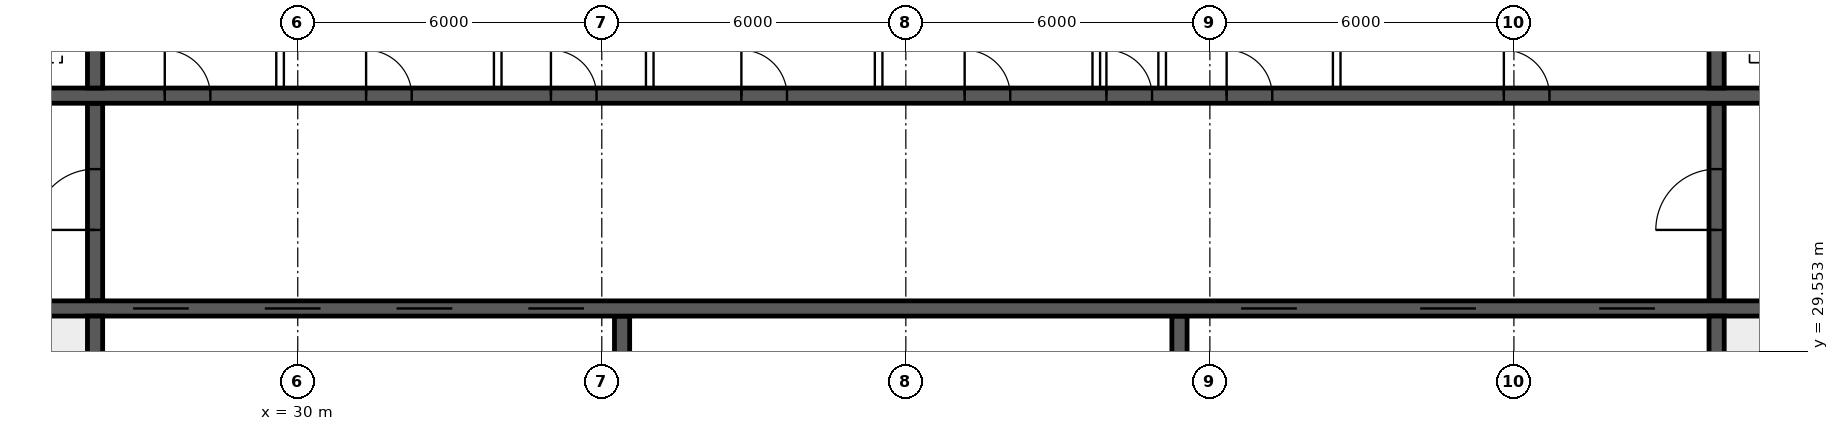
"""IFC4 building model, lengths in metres.
Left out: names, types, materials, properties, quantities, classifications, styles, units other than length and angle.
Written with IfcOpenShell. Run it as: python <this file> out.ifc"""

import sys

from ifc_helpers import new_model, si_unit, direction, frame, frame_2d, origin, place, context, subcontext, project, spatial, rectangle, extrude, element, fill, save


model = new_model("IFC4")
c1 = context("Model", 3, precision=1e-05, world=origin(), true_north=direction((0.0, 1.0)))
c2 = subcontext(c1, "Body", "Model", "MODEL_VIEW")
j1 = project(units=[si_unit("LENGTHUNIT", "METRE"), si_unit("PLANEANGLEUNIT", "RADIAN")], contexts=[c1])
p1 = place(None, origin())
s1 = spatial("IfcSite", under=j1, at=p1, CompositionType="ELEMENT")
p2 = place(p1, origin())
s2 = spatial("IfcBuilding", under=s1, at=p2, CompositionType="ELEMENT")
p3 = place(p2, frame((0.0, 0.0, 11.0)))
s3 = spatial("IfcBuildingStorey", under=s2, at=p3, CompositionType="ELEMENT", Elevation=11.0)
p4 = place(p3, frame((18.5, 30.4, 0.0), z_axis=(0.0, 0.0, 1.0), x_axis=(1.0, 0.0, 0.0)))
e1 = element("IfcWall", 1, at=p4, inside=s3, PredefinedType="SHEAR", context=c2, shape_type="SweptSolid", body=[
    extrude(rectangle(XDim=47.0, YDim=0.3, at=frame_2d((23.5, 0.0))), origin(), (0.0, 0.0, 1.0), 5.0),
])
p5 = place(p4, frame((0.4, 0.0, 0.0)))
e2 = element("IfcOpeningElement", 2, at=p5, cuts=e1, PredefinedType="OPENING", context=c2, shape_type="SweptSolid", body=[
    extrude(rectangle(XDim=1.0, YDim=2.1, at=frame_2d((0.5, 1.05))), frame((0.0, 0.16, 0.0), z_axis=(0.0, -1.0, 0.0), x_axis=(1.0, 0.0, 0.0)), (0.0, 0.0, 1.0), 0.32),
])
p6 = place(p4, frame((45.6, 0.0, 0.0)))
e3 = element("IfcOpeningElement", 3, at=p6, cuts=e1, PredefinedType="OPENING", context=c2, shape_type="SweptSolid", body=[
    extrude(rectangle(XDim=1.0, YDim=2.1, at=frame_2d((0.5, 1.05))), frame((0.0, 0.16, 0.0), z_axis=(0.0, -1.0, 0.0), x_axis=(1.0, 0.0, 0.0)), (0.0, 0.0, 1.0), 0.32),
])
p7 = place(p4, frame((8.25, 0.0, 0.0)))
e4 = element("IfcOpeningElement", 4, at=p7, cuts=e1, PredefinedType="OPENING", context=c2, shape_type="SweptSolid", body=[
    extrude(rectangle(XDim=1.1, YDim=2.1, at=frame_2d((0.55, 1.05))), frame((0.0, 0.16, 0.0), z_axis=(0.0, -1.0, 0.0), x_axis=(1.0, 0.0, 0.0)), (0.0, 0.0, 1.0), 0.32),
])
p8 = place(p4, frame((10.85, 0.0, 0.0)))
e5 = element("IfcOpeningElement", 5, at=p8, cuts=e1, PredefinedType="OPENING", context=c2, shape_type="SweptSolid", body=[
    extrude(rectangle(XDim=1.1, YDim=2.1, at=frame_2d((0.55, 1.05))), frame((0.0, 0.16, 0.0), z_axis=(0.0, -1.0, 0.0), x_axis=(1.0, 0.0, 0.0)), (0.0, 0.0, 1.0), 0.32),
])
p9 = place(p4, frame((13.45, 0.0, 0.0)))
e6 = element("IfcOpeningElement", 6, at=p9, cuts=e1, PredefinedType="OPENING", context=c2, shape_type="SweptSolid", body=[
    extrude(rectangle(XDim=1.1, YDim=2.1, at=frame_2d((0.55, 1.05))), frame((0.0, 0.16, 0.0), z_axis=(0.0, -1.0, 0.0), x_axis=(1.0, 0.0, 0.0)), (0.0, 0.0, 1.0), 0.32),
])
p10 = place(p4, frame((16.05, 0.0, 0.0)))
e7 = element("IfcOpeningElement", 7, at=p10, cuts=e1, PredefinedType="OPENING", context=c2, shape_type="SweptSolid", body=[
    extrude(rectangle(XDim=1.1, YDim=2.1, at=frame_2d((0.55, 1.05))), frame((0.0, 0.16, 0.0), z_axis=(0.0, -1.0, 0.0), x_axis=(1.0, 0.0, 0.0)), (0.0, 0.0, 1.0), 0.32),
])
p11 = place(p4, frame((30.117, 0.0, 0.0)))
e8 = element("IfcOpeningElement", 8, at=p11, cuts=e1, PredefinedType="OPENING", context=c2, shape_type="SweptSolid", body=[
    extrude(rectangle(XDim=1.1, YDim=2.1, at=frame_2d((0.55, 1.05))), frame((0.0, 0.16, 0.0), z_axis=(0.0, -1.0, 0.0), x_axis=(1.0, 0.0, 0.0)), (0.0, 0.0, 1.0), 0.32),
])
p12 = place(p4, frame((33.65, 0.0, 0.0)))
e9 = element("IfcOpeningElement", 9, at=p12, cuts=e1, PredefinedType="OPENING", context=c2, shape_type="SweptSolid", body=[
    extrude(rectangle(XDim=1.1, YDim=2.1, at=frame_2d((0.55, 1.05))), frame((0.0, 0.16, 0.0), z_axis=(0.0, -1.0, 0.0), x_axis=(1.0, 0.0, 0.0)), (0.0, 0.0, 1.0), 0.32),
])
p13 = place(p4, frame((37.183, 0.0, 0.0)))
e10 = element("IfcOpeningElement", 10, at=p13, cuts=e1, PredefinedType="OPENING", context=c2, shape_type="SweptSolid", body=[
    extrude(rectangle(XDim=1.1, YDim=2.1, at=frame_2d((0.55, 1.05))), frame((0.0, 0.16, 0.0), z_axis=(0.0, -1.0, 0.0), x_axis=(1.0, 0.0, 0.0)), (0.0, 0.0, 1.0), 0.32),
])
p14 = place(p3, frame((18.5, 34.6, 0.0), z_axis=(0.0, 0.0, 1.0), x_axis=(1.0, 0.0, 0.0)))
e11 = element("IfcWall", 11, at=p14, inside=s3, PredefinedType="SHEAR", context=c2, shape_type="SweptSolid", body=[
    extrude(rectangle(XDim=47.0, YDim=0.3, at=frame_2d((23.5, 0.0))), origin(), (0.0, 0.0, 1.0), 5.0),
])
p15 = place(p14, frame((0.9, 0.0, 0.0)))
e12 = element("IfcOpeningElement", 12, at=p15, cuts=e11, PredefinedType="OPENING", context=c2, shape_type="SweptSolid", body=[
    extrude(rectangle(XDim=1.1, YDim=2.1, at=frame_2d((0.55, 1.05))), frame((0.0, 0.16, 0.0), z_axis=(0.0, -1.0, 0.0), x_axis=(1.0, 0.0, 0.0)), (0.0, 0.0, 1.0), 0.32),
])
p16 = place(p14, frame((45.0, 0.0, 0.0)))
e13 = element("IfcOpeningElement", 13, at=p16, cuts=e11, PredefinedType="OPENING", context=c2, shape_type="SweptSolid", body=[
    extrude(rectangle(XDim=1.1, YDim=2.1, at=frame_2d((0.55, 1.05))), frame((0.0, 0.16, 0.0), z_axis=(0.0, -1.0, 0.0), x_axis=(1.0, 0.0, 0.0)), (0.0, 0.0, 1.0), 0.32),
])
p17 = place(p14, frame((4.1, 0.0, 0.0)))
e14 = element("IfcOpeningElement", 14, at=p17, cuts=e11, PredefinedType="OPENING", context=c2, shape_type="SweptSolid", body=[
    extrude(rectangle(XDim=0.9, YDim=2.1, at=frame_2d((0.45, 1.05))), frame((0.0, 0.16, 0.0), z_axis=(0.0, -1.0, 0.0), x_axis=(1.0, 0.0, 0.0)), (0.0, 0.0, 1.0), 0.32),
])
p18 = place(p14, frame((42.0, 0.0, 0.0)))
e15 = element("IfcOpeningElement", 15, at=p18, cuts=e11, PredefinedType="OPENING", context=c2, shape_type="SweptSolid", body=[
    extrude(rectangle(XDim=0.9, YDim=2.1, at=frame_2d((0.45, 1.05))), frame((0.0, 0.16, 0.0), z_axis=(0.0, -1.0, 0.0), x_axis=(1.0, 0.0, 0.0)), (0.0, 0.0, 1.0), 0.32),
])
p19 = place(p14, frame((8.875, 0.0, 0.0)))
e16 = element("IfcOpeningElement", 16, at=p19, cuts=e11, PredefinedType="OPENING", context=c2, shape_type="SweptSolid", body=[
    extrude(rectangle(XDim=0.9, YDim=2.1, at=frame_2d((0.45, 1.05))), frame((0.0, 0.16, 0.0), z_axis=(0.0, -1.0, 0.0), x_axis=(1.0, 0.0, 0.0)), (0.0, 0.0, 1.0), 0.32),
])
p20 = place(p14, frame((12.849, 0.0, 0.0)))
e17 = element("IfcOpeningElement", 17, at=p20, cuts=e11, PredefinedType="OPENING", context=c2, shape_type="SweptSolid", body=[
    extrude(rectangle(XDim=0.9, YDim=2.1, at=frame_2d((0.45, 1.05))), frame((0.0, 0.16, 0.0), z_axis=(0.0, -1.0, 0.0), x_axis=(1.0, 0.0, 0.0)), (0.0, 0.0, 1.0), 0.32),
])
p21 = place(p14, frame((16.496, 0.0, 0.0)))
e18 = element("IfcOpeningElement", 18, at=p21, cuts=e11, PredefinedType="OPENING", context=c2, shape_type="SweptSolid", body=[
    extrude(rectangle(XDim=0.9, YDim=2.1, at=frame_2d((0.45, 1.05))), frame((0.0, 0.16, 0.0), z_axis=(0.0, -1.0, 0.0), x_axis=(1.0, 0.0, 0.0)), (0.0, 0.0, 1.0), 0.32),
])
p22 = place(p14, frame((20.255, 0.0, 0.0)))
e19 = element("IfcOpeningElement", 19, at=p22, cuts=e11, PredefinedType="OPENING", context=c2, shape_type="SweptSolid", body=[
    extrude(rectangle(XDim=0.9, YDim=2.1, at=frame_2d((0.45, 1.05))), frame((0.0, 0.16, 0.0), z_axis=(0.0, -1.0, 0.0), x_axis=(1.0, 0.0, 0.0)), (0.0, 0.0, 1.0), 0.32),
])
p23 = place(p14, frame((24.661, 0.0, 0.0)))
e20 = element("IfcOpeningElement", 20, at=p23, cuts=e11, PredefinedType="OPENING", context=c2, shape_type="SweptSolid", body=[
    extrude(rectangle(XDim=0.9, YDim=2.1, at=frame_2d((0.45, 1.05))), frame((0.0, 0.16, 0.0), z_axis=(0.0, -1.0, 0.0), x_axis=(1.0, 0.0, 0.0)), (0.0, 0.0, 1.0), 0.32),
])
p24 = place(p14, frame((27.458, 0.0, 0.0)))
e21 = element("IfcOpeningElement", 21, at=p24, cuts=e11, PredefinedType="OPENING", context=c2, shape_type="SweptSolid", body=[
    extrude(rectangle(XDim=0.9, YDim=2.1, at=frame_2d((0.45, 1.05))), frame((0.0, 0.16, 0.0), z_axis=(0.0, -1.0, 0.0), x_axis=(1.0, 0.0, 0.0)), (0.0, 0.0, 1.0), 0.32),
])
p25 = place(p14, frame((29.831, 0.0, 0.0)))
e22 = element("IfcOpeningElement", 22, at=p25, cuts=e11, PredefinedType="OPENING", context=c2, shape_type="SweptSolid", body=[
    extrude(rectangle(XDim=0.9, YDim=2.1, at=frame_2d((0.45, 1.05))), frame((0.0, 0.16, 0.0), z_axis=(0.0, -1.0, 0.0), x_axis=(1.0, 0.0, 0.0)), (0.0, 0.0, 1.0), 0.32),
])
p26 = place(p14, frame((35.302, 0.0, 0.0)))
e23 = element("IfcOpeningElement", 23, at=p26, cuts=e11, PredefinedType="OPENING", context=c2, shape_type="SweptSolid", body=[
    extrude(rectangle(XDim=0.9, YDim=2.1, at=frame_2d((0.45, 1.05))), frame((0.0, 0.16, 0.0), z_axis=(0.0, -1.0, 0.0), x_axis=(1.0, 0.0, 0.0)), (0.0, 0.0, 1.0), 0.32),
])
for number, where, z_axis, x_axis in (
    (24, (26.0, 26.3, 0.0), (0.0, 0.0, 1.0), (0.0, 1.0, 0.0)),
    (25, (58.0, 26.3, 0.0), (0.0, 0.0, 1.0), (0.0, 1.0, 0.0)),
):
    element("IfcWall", number, at=place(p3, frame(where, z_axis=z_axis, x_axis=x_axis)), inside=s3, PredefinedType="SHEAR", context=c2, shape_type="SweptSolid", body=[
        extrude(rectangle(XDim=3.95, YDim=0.3, at=frame_2d((1.975, 0.0))), origin(), (0.0, 0.0, 1.0), 5.0),
    ])
p27 = place(p3, frame((26.0, 30.55, 0.0), z_axis=(0.0, 0.0, 1.0), x_axis=(0.0, 1.0, 0.0)))
e26 = element("IfcWall", 26, at=p27, inside=s3, PredefinedType="SHEAR", context=c2, shape_type="SweptSolid", body=[
    extrude(rectangle(XDim=3.9, YDim=0.3, at=frame_2d((1.95, 0.0))), origin(), (0.0, 0.0, 1.0), 5.0),
])
p28 = place(p27, frame((1.4, 0.0, 0.0)))
e27 = element("IfcOpeningElement", 27, at=p28, cuts=e26, PredefinedType="OPENING", context=c2, shape_type="SweptSolid", body=[
    extrude(rectangle(XDim=1.2, YDim=2.1, at=frame_2d((0.6, 1.05))), frame((0.0, 0.16, 0.0), z_axis=(0.0, -1.0, 0.0), x_axis=(1.0, 0.0, 0.0)), (0.0, 0.0, 1.0), 0.32),
])
p29 = place(p3, frame((58.0, 30.55, 0.0), z_axis=(0.0, 0.0, 1.0), x_axis=(0.0, 1.0, 0.0)))
e28 = element("IfcWall", 28, at=p29, inside=s3, PredefinedType="SHEAR", context=c2, shape_type="SweptSolid", body=[
    extrude(rectangle(XDim=3.9, YDim=0.3, at=frame_2d((1.95, 0.0))), origin(), (0.0, 0.0, 1.0), 5.0),
])
p30 = place(p29, frame((1.4, 0.0, 0.0)))
e29 = element("IfcOpeningElement", 29, at=p30, cuts=e28, PredefinedType="OPENING", context=c2, shape_type="SweptSolid", body=[
    extrude(rectangle(XDim=1.2, YDim=2.1, at=frame_2d((0.6, 1.05))), frame((0.0, 0.16, 0.0), z_axis=(0.0, -1.0, 0.0), x_axis=(1.0, 0.0, 0.0)), (0.0, 0.0, 1.0), 0.32),
])
for number, where, z_axis, x_axis in (
    (30, (26.0, 34.75, 0.0), (0.0, 0.0, 1.0), (0.0, 1.0, 0.0)),
    (31, (58.0, 34.75, 0.0), (0.0, 0.0, 1.0), (0.0, 1.0, 0.0)),
):
    element("IfcWall", number, at=place(p3, frame(where, z_axis=z_axis, x_axis=x_axis)), inside=s3, PredefinedType="SHEAR", context=c2, shape_type="SweptSolid", body=[
        extrude(rectangle(XDim=2.95, YDim=0.3, at=frame_2d((1.475, 0.0))), origin(), (0.0, 0.0, 1.0), 5.0),
    ])
for number, where, z_axis, x_axis in (
    (32, (36.4, 26.3, 0.0), (0.0, 0.0, 1.0), (0.0, 1.0, 0.0)),
    (33, (47.4, 26.3, 0.0), (0.0, 0.0, 1.0), (0.0, 1.0, 0.0)),
):
    element("IfcWall", number, at=place(p3, frame(where, z_axis=z_axis, x_axis=x_axis)), inside=s3, PredefinedType="SHEAR", context=c2, shape_type="SweptSolid", body=[
        extrude(rectangle(XDim=3.95, YDim=0.3, at=frame_2d((1.975, 0.0))), origin(), (0.0, 0.0, 1.0), 5.0),
    ])
for number, where, z_axis, x_axis in (
    (34, (29.651, 34.75, 0.0), (0.0, 0.0, 1.0), (0.0, 1.0, 0.0)),
    (35, (33.946, 34.75, 0.0), (0.0, 0.0, 1.0), (0.0, 1.0, 0.0)),
    (36, (36.946, 34.75, 0.0), (0.0, 0.0, 1.0), (0.0, 1.0, 0.0)),
    (37, (41.463, 34.75, 0.0), (0.0, 0.0, 1.0), (0.0, 1.0, 0.0)),
    (38, (45.758, 34.75, 0.0), (0.0, 0.0, 1.0), (0.0, 1.0, 0.0)),
    (39, (47.058, 34.75, 0.0), (0.0, 0.0, 1.0), (0.0, 1.0, 0.0)),
    (40, (50.503, 34.75, 0.0), (0.0, 0.0, 1.0), (0.0, 1.0, 0.0)),
):
    element("IfcWall", number, at=place(p3, frame(where, z_axis=z_axis, x_axis=x_axis)), inside=s3, PredefinedType="SOLIDWALL", context=c2, shape_type="SweptSolid", body=[
        extrude(rectangle(XDim=2.95, YDim=0.15, at=frame_2d((1.475, 0.0))), origin(), (0.0, 0.0, 1.0), 4.6),
    ])
p31 = place(p28, origin())
e41 = element("IfcDoor", 41, at=p31, inside=s3, OperationType="SINGLE_SWING_LEFT", PredefinedType="DOOR", context=c2, shape_type="SweptSolid", body=[
    extrude(rectangle(XDim=1.2, YDim=2.1, at=frame_2d((0.6, 1.05))), frame((0.0, 0.025, 0.0), z_axis=(0.0, -1.0, 0.0), x_axis=(1.0, 0.0, 0.0)), (0.0, 0.0, 1.0), 0.05),
])
fill(e27, e41)
p32 = place(p30, origin())
e42 = element("IfcDoor", 42, at=p32, inside=s3, OperationType="SINGLE_SWING_LEFT", PredefinedType="DOOR", context=c2, shape_type="SweptSolid", body=[
    extrude(rectangle(XDim=1.2, YDim=2.1, at=frame_2d((0.6, 1.05))), frame((0.0, 0.025, 0.0), z_axis=(0.0, -1.0, 0.0), x_axis=(1.0, 0.0, 0.0)), (0.0, 0.0, 1.0), 0.05),
])
fill(e29, e42)
p33 = place(p19, origin())
e43 = element("IfcDoor", 43, at=p33, inside=s3, OperationType="SINGLE_SWING_LEFT", PredefinedType="DOOR", context=c2, shape_type="SweptSolid", body=[
    extrude(rectangle(XDim=0.9, YDim=2.1, at=frame_2d((0.45, 1.05))), frame((0.0, 0.025, 0.0), z_axis=(0.0, -1.0, 0.0), x_axis=(1.0, 0.0, 0.0)), (0.0, 0.0, 1.0), 0.05),
])
fill(e16, e43)
p34 = place(p20, origin())
e44 = element("IfcDoor", 44, at=p34, inside=s3, OperationType="SINGLE_SWING_LEFT", PredefinedType="DOOR", context=c2, shape_type="SweptSolid", body=[
    extrude(rectangle(XDim=0.9, YDim=2.1, at=frame_2d((0.45, 1.05))), frame((0.0, 0.025, 0.0), z_axis=(0.0, -1.0, 0.0), x_axis=(1.0, 0.0, 0.0)), (0.0, 0.0, 1.0), 0.05),
])
fill(e17, e44)
p35 = place(p21, origin())
e45 = element("IfcDoor", 45, at=p35, inside=s3, OperationType="SINGLE_SWING_LEFT", PredefinedType="DOOR", context=c2, shape_type="SweptSolid", body=[
    extrude(rectangle(XDim=0.9, YDim=2.1, at=frame_2d((0.45, 1.05))), frame((0.0, 0.025, 0.0), z_axis=(0.0, -1.0, 0.0), x_axis=(1.0, 0.0, 0.0)), (0.0, 0.0, 1.0), 0.05),
])
fill(e18, e45)
p36 = place(p22, origin())
e46 = element("IfcDoor", 46, at=p36, inside=s3, OperationType="SINGLE_SWING_LEFT", PredefinedType="DOOR", context=c2, shape_type="SweptSolid", body=[
    extrude(rectangle(XDim=0.9, YDim=2.1, at=frame_2d((0.45, 1.05))), frame((0.0, 0.025, 0.0), z_axis=(0.0, -1.0, 0.0), x_axis=(1.0, 0.0, 0.0)), (0.0, 0.0, 1.0), 0.05),
])
fill(e19, e46)
p37 = place(p23, origin())
e47 = element("IfcDoor", 47, at=p37, inside=s3, OperationType="SINGLE_SWING_LEFT", PredefinedType="DOOR", context=c2, shape_type="SweptSolid", body=[
    extrude(rectangle(XDim=0.9, YDim=2.1, at=frame_2d((0.45, 1.05))), frame((0.0, 0.025, 0.0), z_axis=(0.0, -1.0, 0.0), x_axis=(1.0, 0.0, 0.0)), (0.0, 0.0, 1.0), 0.05),
])
fill(e20, e47)
p38 = place(p24, origin())
e48 = element("IfcDoor", 48, at=p38, inside=s3, OperationType="SINGLE_SWING_LEFT", PredefinedType="DOOR", context=c2, shape_type="SweptSolid", body=[
    extrude(rectangle(XDim=0.9, YDim=2.1, at=frame_2d((0.45, 1.05))), frame((0.0, 0.025, 0.0), z_axis=(0.0, -1.0, 0.0), x_axis=(1.0, 0.0, 0.0)), (0.0, 0.0, 1.0), 0.05),
])
fill(e21, e48)
p39 = place(p25, origin())
e49 = element("IfcDoor", 49, at=p39, inside=s3, OperationType="SINGLE_SWING_LEFT", PredefinedType="DOOR", context=c2, shape_type="SweptSolid", body=[
    extrude(rectangle(XDim=0.9, YDim=2.1, at=frame_2d((0.45, 1.05))), frame((0.0, 0.025, 0.0), z_axis=(0.0, -1.0, 0.0), x_axis=(1.0, 0.0, 0.0)), (0.0, 0.0, 1.0), 0.05),
])
fill(e22, e49)
p40 = place(p26, origin())
e50 = element("IfcDoor", 50, at=p40, inside=s3, OperationType="SINGLE_SWING_LEFT", PredefinedType="DOOR", context=c2, shape_type="SweptSolid", body=[
    extrude(rectangle(XDim=0.9, YDim=2.1, at=frame_2d((0.45, 1.05))), frame((0.0, 0.025, 0.0), z_axis=(0.0, -1.0, 0.0), x_axis=(1.0, 0.0, 0.0)), (0.0, 0.0, 1.0), 0.05),
])
fill(e23, e50)
p41 = place(p7, origin())
e51 = element("IfcDoor", 51, at=p41, inside=s3, OperationType="DOUBLE_DOOR_SLIDING", PredefinedType="DOOR", context=c2, shape_type="SweptSolid", body=[
    extrude(rectangle(XDim=1.1, YDim=2.1, at=frame_2d((0.55, 1.05))), frame((0.0, 0.025, 0.0), z_axis=(0.0, -1.0, 0.0), x_axis=(1.0, 0.0, 0.0)), (0.0, 0.0, 1.0), 0.05),
])
fill(e4, e51)
p42 = place(p8, origin())
e52 = element("IfcDoor", 52, at=p42, inside=s3, OperationType="DOUBLE_DOOR_SLIDING", PredefinedType="DOOR", context=c2, shape_type="SweptSolid", body=[
    extrude(rectangle(XDim=1.1, YDim=2.1, at=frame_2d((0.55, 1.05))), frame((0.0, 0.025, 0.0), z_axis=(0.0, -1.0, 0.0), x_axis=(1.0, 0.0, 0.0)), (0.0, 0.0, 1.0), 0.05),
])
fill(e5, e52)
p43 = place(p9, origin())
e53 = element("IfcDoor", 53, at=p43, inside=s3, OperationType="DOUBLE_DOOR_SLIDING", PredefinedType="DOOR", context=c2, shape_type="SweptSolid", body=[
    extrude(rectangle(XDim=1.1, YDim=2.1, at=frame_2d((0.55, 1.05))), frame((0.0, 0.025, 0.0), z_axis=(0.0, -1.0, 0.0), x_axis=(1.0, 0.0, 0.0)), (0.0, 0.0, 1.0), 0.05),
])
fill(e6, e53)
p44 = place(p10, origin())
e54 = element("IfcDoor", 54, at=p44, inside=s3, OperationType="DOUBLE_DOOR_SLIDING", PredefinedType="DOOR", context=c2, shape_type="SweptSolid", body=[
    extrude(rectangle(XDim=1.1, YDim=2.1, at=frame_2d((0.55, 1.05))), frame((0.0, 0.025, 0.0), z_axis=(0.0, -1.0, 0.0), x_axis=(1.0, 0.0, 0.0)), (0.0, 0.0, 1.0), 0.05),
])
fill(e7, e54)
p45 = place(p11, origin())
e55 = element("IfcDoor", 55, at=p45, inside=s3, OperationType="DOUBLE_DOOR_SLIDING", PredefinedType="DOOR", context=c2, shape_type="SweptSolid", body=[
    extrude(rectangle(XDim=1.1, YDim=2.1, at=frame_2d((0.55, 1.05))), frame((0.0, 0.025, 0.0), z_axis=(0.0, -1.0, 0.0), x_axis=(1.0, 0.0, 0.0)), (0.0, 0.0, 1.0), 0.05),
])
fill(e8, e55)
p46 = place(p12, origin())
e56 = element("IfcDoor", 56, at=p46, inside=s3, OperationType="DOUBLE_DOOR_SLIDING", PredefinedType="DOOR", context=c2, shape_type="SweptSolid", body=[
    extrude(rectangle(XDim=1.1, YDim=2.1, at=frame_2d((0.55, 1.05))), frame((0.0, 0.025, 0.0), z_axis=(0.0, -1.0, 0.0), x_axis=(1.0, 0.0, 0.0)), (0.0, 0.0, 1.0), 0.05),
])
fill(e9, e56)
p47 = place(p13, origin())
e57 = element("IfcDoor", 57, at=p47, inside=s3, OperationType="DOUBLE_DOOR_SLIDING", PredefinedType="DOOR", context=c2, shape_type="SweptSolid", body=[
    extrude(rectangle(XDim=1.1, YDim=2.1, at=frame_2d((0.55, 1.05))), frame((0.0, 0.025, 0.0), z_axis=(0.0, -1.0, 0.0), x_axis=(1.0, 0.0, 0.0)), (0.0, 0.0, 1.0), 0.05),
])
fill(e10, e57)
save(model, sys.argv[1])
